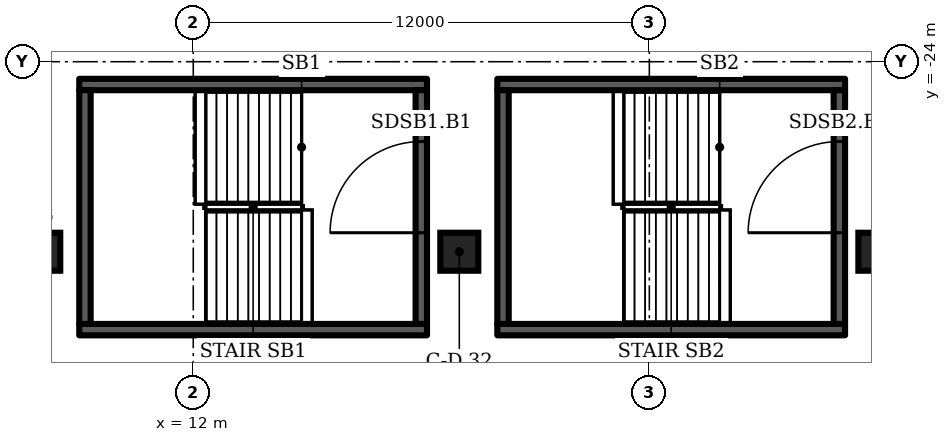
"""IFC4 building model, lengths in metres.
Left out: names, types, materials, properties, quantities, classifications, styles, units other than length and angle.
Written with IfcOpenShell. Run it as: python <this file> out.ifc"""

import sys

from ifc_helpers import new_model, si_unit, direction, frame, frame_2d, origin, origin_2d, place, context, subcontext, project, spatial, rectangle, extrude, element, fill, save


model = new_model("IFC4")
c1 = context("Model", 3, precision=1e-05, world=origin(), true_north=direction((0.0, 1.0)))
c2 = subcontext(c1, "Body", "Model", "MODEL_VIEW")
j1 = project(units=[si_unit("LENGTHUNIT", "METRE"), si_unit("PLANEANGLEUNIT", "RADIAN")], contexts=[c1])
p1 = place(None, origin())
s1 = spatial("IfcSite", under=j1, at=p1, CompositionType="ELEMENT")
p2 = place(p1, origin())
s2 = spatial("IfcBuilding", under=s1, at=p2, CompositionType="ELEMENT")
p3 = place(p2, frame((0.0, 0.0, -7.2)))
s3 = spatial("IfcBuildingStorey", under=s2, at=p3, CompositionType="ELEMENT", Elevation=-7.2)
for number, where, z_axis, x_axis in (
    (1, (30.0, -29.0, 0.0), (0.0, 0.0, 1.0), (1.0, 0.0, 0.0)),
    (2, (19.0, -29.0, 0.0), (0.0, 0.0, 1.0), (1.0, 0.0, 0.0)),
    (3, (8.0, -29.0, 0.0), (0.0, 0.0, 1.0), (1.0, 0.0, 0.0)),
):
    element("IfcColumn", number, at=place(p3, frame(where, z_axis=z_axis, x_axis=x_axis)), inside=s3, PredefinedType="COLUMN", context=c2, shape_type="SweptSolid", body=[
        extrude(rectangle(XDim=1.0, YDim=1.0, at=origin_2d()), origin(), (0.0, 0.0, 1.0), 7.2),
    ])
for number, where, z_axis, x_axis in (
    (4, (9.0, -31.05, 0.0), (0.0, 0.0, 1.0), (1.0, 0.0, 0.0)),
    (5, (9.0, -24.6, 0.0), (0.0, 0.0, 1.0), (1.0, 0.0, 0.0)),
):
    element("IfcWall", number, at=place(p3, frame(where, z_axis=z_axis, x_axis=x_axis)), inside=s3, PredefinedType="SHEAR", context=c2, shape_type="SweptSolid", body=[
        extrude(rectangle(XDim=9.15, YDim=0.3, at=frame_2d((4.575, 0.0))), origin(), (0.0, 0.0, 1.0), 6.9),
    ])
p4 = place(p3, frame((9.15, -30.9, 0.0), z_axis=(0.0, 0.0, 1.0), x_axis=(0.0, 1.0, 0.0)))
e6 = element("IfcWall", 6, at=p4, inside=s3, PredefinedType="SHEAR", context=c2, shape_type="SweptSolid", body=[
    extrude(rectangle(XDim=6.15, YDim=0.3, at=frame_2d((3.075, 0.0))), origin(), (0.0, 0.0, 1.0), 6.9),
])
p5 = place(p3, frame((18.0, -30.9, 0.0), z_axis=(0.0, 0.0, 1.0), x_axis=(0.0, 1.0, 0.0)))
e7 = element("IfcWall", 7, at=p5, inside=s3, PredefinedType="SHEAR", context=c2, shape_type="SweptSolid", body=[
    extrude(rectangle(XDim=6.15, YDim=0.3, at=frame_2d((3.075, 0.0))), origin(), (0.0, 0.0, 1.0), 6.9),
])
p6 = place(p5, frame((2.4, 0.0, 0.0)))
e8 = element("IfcOpeningElement", 8, at=p6, cuts=e7, PredefinedType="OPENING", context=c2, shape_type="SweptSolid", body=[
    extrude(rectangle(XDim=2.4, YDim=2.1, at=frame_2d((1.2, 1.05))), frame((0.0, 0.16, 0.0), z_axis=(0.0, -1.0, 0.0), x_axis=(1.0, 0.0, 0.0)), (0.0, 0.0, 1.0), 0.32),
])
for number, where, z_axis, x_axis in (
    (9, (20.0, -31.05, 0.0), (0.0, 0.0, 1.0), (1.0, 0.0, 0.0)),
    (10, (20.0, -24.6, 0.0), (0.0, 0.0, 1.0), (1.0, 0.0, 0.0)),
):
    element("IfcWall", number, at=place(p3, frame(where, z_axis=z_axis, x_axis=x_axis)), inside=s3, PredefinedType="SHEAR", context=c2, shape_type="SweptSolid", body=[
        extrude(rectangle(XDim=9.15, YDim=0.3, at=frame_2d((4.575, 0.0))), origin(), (0.0, 0.0, 1.0), 6.9),
    ])
p7 = place(p3, frame((20.15, -30.9, 0.0), z_axis=(0.0, 0.0, 1.0), x_axis=(0.0, 1.0, 0.0)))
e11 = element("IfcWall", 11, at=p7, inside=s3, PredefinedType="SHEAR", context=c2, shape_type="SweptSolid", body=[
    extrude(rectangle(XDim=6.15, YDim=0.3, at=frame_2d((3.075, 0.0))), origin(), (0.0, 0.0, 1.0), 6.9),
])
p8 = place(p3, frame((29.0, -30.9, 0.0), z_axis=(0.0, 0.0, 1.0), x_axis=(0.0, 1.0, 0.0)))
e12 = element("IfcWall", 12, at=p8, inside=s3, PredefinedType="SHEAR", context=c2, shape_type="SweptSolid", body=[
    extrude(rectangle(XDim=6.15, YDim=0.3, at=frame_2d((3.075, 0.0))), origin(), (0.0, 0.0, 1.0), 6.9),
])
p9 = place(p8, frame((2.4, 0.0, 0.0)))
e13 = element("IfcOpeningElement", 13, at=p9, cuts=e12, PredefinedType="OPENING", context=c2, shape_type="SweptSolid", body=[
    extrude(rectangle(XDim=2.4, YDim=2.1, at=frame_2d((1.2, 1.05))), frame((0.0, 0.16, 0.0), z_axis=(0.0, -1.0, 0.0), x_axis=(1.0, 0.0, 0.0)), (0.0, 0.0, 1.0), 0.32),
])
p10 = place(p6, origin())
e14 = element("IfcDoor", 14, at=p10, inside=s3, OperationType="DOUBLE_DOOR_SINGLE_SWING", PredefinedType="DOOR", context=c2, shape_type="SweptSolid", body=[
    extrude(rectangle(XDim=2.4, YDim=2.1, at=frame_2d((1.2, 1.05))), frame((0.0, 0.025, 0.0), z_axis=(0.0, -1.0, 0.0), x_axis=(1.0, 0.0, 0.0)), (0.0, 0.0, 1.0), 0.05),
])
fill(e8, e14)
p11 = place(p9, origin())
e15 = element("IfcDoor", 15, at=p11, inside=s3, OperationType="DOUBLE_DOOR_SINGLE_SWING", PredefinedType="DOOR", context=c2, shape_type="SweptSolid", body=[
    extrude(rectangle(XDim=2.4, YDim=2.1, at=frame_2d((1.2, 1.05))), frame((0.0, 0.025, 0.0), z_axis=(0.0, -1.0, 0.0), x_axis=(1.0, 0.0, 0.0)), (0.0, 0.0, 1.0), 0.05),
])
fill(e13, e15)
save(model, sys.argv[1])
